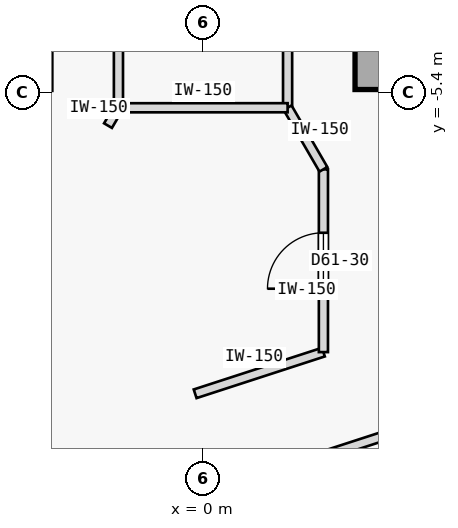
"""IFC4 building model, lengths in metres.
Left out: names, types, materials, properties, quantities, classifications, styles, units other than length and angle.
Written with IfcOpenShell. Run it as: python <this file> out.ifc"""

import sys

from ifc_helpers import new_model, si_unit, direction, frame, frame_2d, origin, origin_2d, place, context, subcontext, project, spatial, rectangle, extrude, element, fill, save


model = new_model("IFC4")
c1 = context("Model", 3, precision=1e-05, world=origin(), true_north=direction((0.0, 1.0)))
c2 = subcontext(c1, "Body", "Model", "MODEL_VIEW")
j1 = project(units=[si_unit("LENGTHUNIT", "METRE"), si_unit("PLANEANGLEUNIT", "RADIAN")], contexts=[c1])
p1 = place(None, origin())
s1 = spatial("IfcSite", under=j1, at=p1, CompositionType="ELEMENT")
p2 = place(p1, origin())
s2 = spatial("IfcBuilding", under=s1, at=p2, CompositionType="ELEMENT")
p3 = place(p2, frame((0.0, 0.0, 231.0)))
s3 = spatial("IfcBuildingStorey", under=s2, at=p3, CompositionType="ELEMENT", Elevation=231.0)
p4 = place(p3, frame((2.95, -4.9, 0.0), z_axis=(0.0, 0.0, 1.0), x_axis=(1.0, 0.0, 0.0)))
e1 = element("IfcColumn", 1, at=p4, inside=s3, PredefinedType="COLUMN", context=c2, shape_type="SweptSolid", body=[
    extrude(rectangle(XDim=0.9, YDim=0.9, at=origin_2d()), origin(), (0.0, 0.0, 1.0), 3.35),
])
p5 = place(p3, frame((-1.391, -5.65, 0.0), z_axis=(0.0, 0.0, 1.0), x_axis=(-8.6422954e-05, 0.999999996266, 0.0)))
e2 = element("IfcWall", 2, at=p5, inside=s3, PredefinedType="PARTITIONING", context=c2, shape_type="SweptSolid", body=[
    extrude(rectangle(XDim=11.3, YDim=0.15, at=frame_2d((5.65, 0.0))), origin(), (0.0, 0.0, 1.0), 3.125),
])
p6 = place(p5, frame((5.175, 0.0, 0.0)))
e3 = element("IfcOpeningElement", 3, at=p6, cuts=e2, PredefinedType="OPENING", context=c2, shape_type="SweptSolid", body=[
    extrude(rectangle(XDim=0.95, YDim=2.15, at=frame_2d((0.475, 1.075))), frame((0.0, 0.085, 0.0), z_axis=(0.0, -1.0, 0.0), x_axis=(1.0, 0.0, 0.0)), (0.0, 0.0, 1.0), 0.17),
])
p7 = place(p3, frame((1.391, -5.648, 0.0), z_axis=(0.0, 0.0, 1.0), x_axis=(-4.3218947e-05, 0.999999999066, 0.0)))
e4 = element("IfcWall", 4, at=p7, inside=s3, PredefinedType="PARTITIONING", context=c2, shape_type="SweptSolid", body=[
    extrude(rectangle(XDim=11.298, YDim=0.15, at=frame_2d((5.649, 0.0))), origin(), (0.0, 0.0, 1.0), 3.125),
])
p8 = place(p3, frame((-1.643, -12.549, 0.0), z_axis=(0.0, 0.0, 1.0), x_axis=(0.951058161173, 0.309011931914, 0.0)))
e5 = element("IfcWall", 5, at=p8, inside=s3, PredefinedType="PARTITIONING", context=c2, shape_type="SweptSolid", body=[
    extrude(rectangle(XDim=7.297, YDim=0.15, at=frame_2d((3.648, 0.0))), origin(), (0.0, 0.0, 1.0), 3.125),
])
p9 = place(p3, frame((-0.129, -10.354, 0.0), z_axis=(0.0, 0.0, 1.0), x_axis=(0.951066420845, 0.308986509643, 0.0)))
e6 = element("IfcWall", 6, at=p9, inside=s3, PredefinedType="PARTITIONING", context=c2, shape_type="SweptSolid", body=[
    extrude(rectangle(XDim=2.218, YDim=0.15, at=frame_2d((1.109, 0.0))), origin(), (0.0, 0.0, 1.0), 3.125),
])
p10 = place(p3, frame((-1.562, -5.944, 0.0), z_axis=(0.0, 0.0, 1.0), x_axis=(0.505387839696, 0.862892305845, 0.0)))
e7 = element("IfcWall", 7, at=p10, inside=s3, PredefinedType="PARTITIONING", context=c2, shape_type="SweptSolid", body=[
    extrude(rectangle(XDim=0.34, YDim=0.15, at=frame_2d((0.17, 0.0))), origin(), (0.0, 0.0, 1.0), 3.125),
])
p11 = place(p3, frame((1.98, -9.668, 0.0), z_axis=(0.0, 0.0, 1.0), x_axis=(8.1241368e-05, 0.9999999967, 0.0)))
e8 = element("IfcWall", 8, at=p11, inside=s3, PredefinedType="PARTITIONING", context=c2, shape_type="SweptSolid", body=[
    extrude(rectangle(XDim=3.005, YDim=0.15, at=frame_2d((1.502, 0.0))), origin(), (0.0, 0.0, 1.0), 3.125),
])
p12 = place(p11, frame((1.042, 0.0, 0.0)))
e9 = element("IfcOpeningElement", 9, at=p12, cuts=e8, PredefinedType="OPENING", context=c2, shape_type="SweptSolid", body=[
    extrude(rectangle(XDim=0.92, YDim=2.15, at=frame_2d((0.46, 1.075))), frame((0.0, 0.085, 0.0), z_axis=(0.0, -1.0, 0.0), x_axis=(1.0, 0.0, 0.0)), (0.0, 0.0, 1.0), 0.17),
])
p13 = place(p3, frame((1.391, -5.649, 0.0), z_axis=(0.0, 0.0, 1.0), x_axis=(0.502522642426, -0.864564048437, 0.0)))
e10 = element("IfcWall", 10, at=p13, inside=s3, PredefinedType="PARTITIONING", context=c2, shape_type="SweptSolid", body=[
    extrude(rectangle(XDim=1.171, YDim=0.15, at=frame_2d((0.586, 0.0))), origin(), (0.0, 0.0, 1.0), 3.125),
])
p14 = place(p3, frame((-1.391, -5.65, 0.0), z_axis=(0.0, 0.0, 1.0), x_axis=(0.999999965344, 0.000263273356, 0.0)))
e11 = element("IfcWall", 11, at=p14, inside=s3, PredefinedType="PARTITIONING", context=c2, shape_type="SweptSolid", body=[
    extrude(rectangle(XDim=2.782, YDim=0.15, at=frame_2d((1.391, 0.0))), origin(), (0.0, 0.0, 1.0), 3.125),
])
p15 = place(p12, origin())
e12 = element("IfcDoor", 12, at=p15, inside=s3, OperationType="SINGLE_SWING_LEFT", PredefinedType="DOOR", context=c2, shape_type="SweptSolid", body=[
    extrude(rectangle(XDim=0.92, YDim=2.15, at=frame_2d((0.46, 1.075))), frame((0.0, 0.025, 0.0), z_axis=(0.0, -1.0, 0.0), x_axis=(1.0, 0.0, 0.0)), (0.0, 0.0, 1.0), 0.05),
])
fill(e9, e12)
save(model, sys.argv[1])
